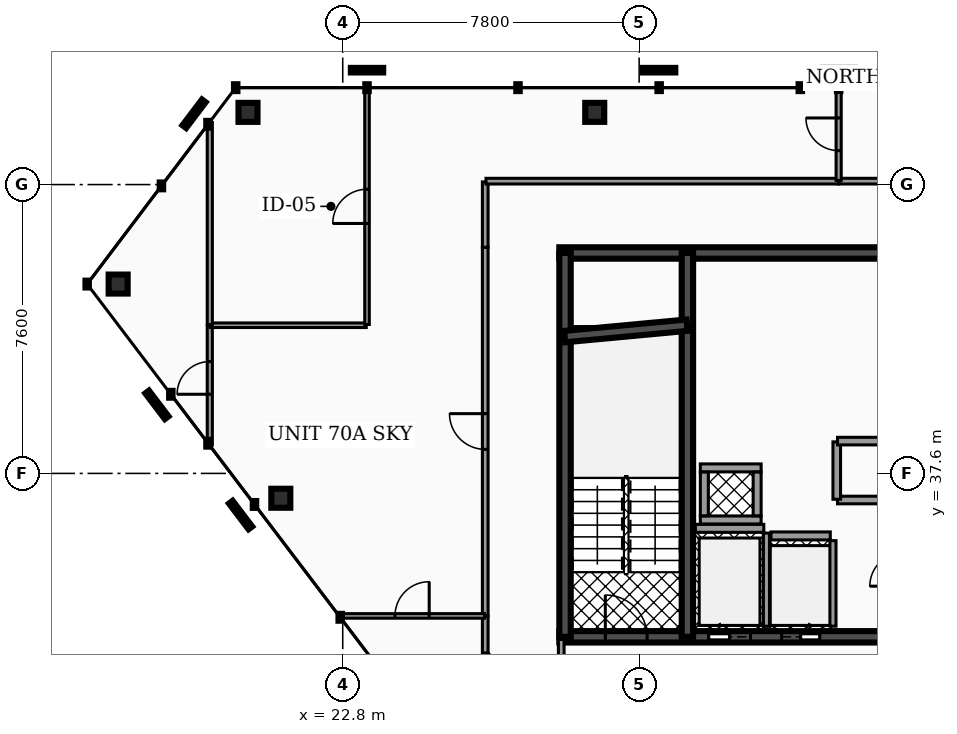
"""IFC4 building model, lengths in metres.
Left out: names, types, materials, properties, quantities, classifications, styles, units other than length and angle.
Written with IfcOpenShell. Run it as: python <this file> out.ifc"""

import sys

from ifc_helpers import new_model, si_unit, direction, frame, frame_2d, origin, origin_2d, place, context, subcontext, project, spatial, rectangle, hollow_rectangle, extrude, element, fill, save


model = new_model("IFC4")
c1 = context("Model", 3, precision=1e-05, world=origin(), true_north=direction((0.0, 1.0)))
c2 = subcontext(c1, "Body", "Model", "MODEL_VIEW")
j1 = project(units=[si_unit("LENGTHUNIT", "METRE"), si_unit("PLANEANGLEUNIT", "RADIAN")], contexts=[c1])
p1 = place(None, origin())
s1 = spatial("IfcSite", under=j1, at=p1, CompositionType="ELEMENT")
p2 = place(p1, origin())
s2 = spatial("IfcBuilding", under=s1, at=p2, CompositionType="ELEMENT")
p3 = place(p2, frame((0.0, 0.0, 275.4)))
s3 = spatial("IfcBuildingStorey", under=s2, at=p3, CompositionType="ELEMENT", Elevation=275.4)
p4 = place(p3, frame((28.5, 43.4, 0.0), z_axis=(0.0, 0.0, 1.0), x_axis=(1.0, 0.0, 0.0)))
e1 = element("IfcWall", 1, at=p4, inside=s3, PredefinedType="SHEAR", context=c2, shape_type="SweptSolid", body=[
    extrude(rectangle(XDim=19.86, YDim=0.3, at=frame_2d((9.93, 0.0))), origin(), (0.0, 0.0, 1.0), 3.18),
])
p5 = place(p3, frame((28.5, 33.3, 0.0), z_axis=(0.0, 0.0, 1.0), x_axis=(1.0, 0.0, 0.0)))
e2 = element("IfcWall", 2, at=p5, inside=s3, PredefinedType="SHEAR", context=c2, shape_type="SweptSolid", body=[
    extrude(rectangle(XDim=19.86, YDim=0.3, at=frame_2d((9.93, 0.0))), origin(), (0.0, 0.0, 1.0), 3.18),
])
p6 = place(p5, frame((3.93, 0.0, 0.0)))
e3 = element("IfcOpeningElement", 3, at=p6, cuts=e2, PredefinedType="OPENING", context=c2, shape_type="SweptSolid", body=[
    extrude(rectangle(XDim=1.1, YDim=2.15, at=frame_2d((0.55, 1.075))), frame((0.0, 0.16, 0.0), z_axis=(0.0, -1.0, 0.0), x_axis=(1.0, 0.0, 0.0)), (0.0, 0.0, 1.0), 0.32),
])
p7 = place(p5, frame((14.77, 0.0, 0.0)))
e4 = element("IfcOpeningElement", 4, at=p7, cuts=e2, PredefinedType="OPENING", context=c2, shape_type="SweptSolid", body=[
    extrude(rectangle(XDim=1.1, YDim=2.15, at=frame_2d((0.55, 1.075))), frame((0.0, 0.16, 0.0), z_axis=(0.0, -1.0, 0.0), x_axis=(1.0, 0.0, 0.0)), (0.0, 0.0, 1.0), 0.32),
])
p8 = place(p5, frame((11.25, 0.0, 0.0)))
e5 = element("IfcOpeningElement", 5, at=p8, cuts=e2, PredefinedType="OPENING", context=c2, shape_type="SweptSolid", body=[
    extrude(rectangle(XDim=1.0, YDim=2.1, at=frame_2d((0.5, 1.05))), frame((0.0, 0.16, 0.0), z_axis=(0.0, -1.0, 0.0), x_axis=(1.0, 0.0, 0.0)), (0.0, 0.0, 1.0), 0.32),
])
p9 = place(p5, frame((12.95, 0.0, 0.0)))
e6 = element("IfcOpeningElement", 6, at=p9, cuts=e2, PredefinedType="OPENING", context=c2, shape_type="SweptSolid", body=[
    extrude(rectangle(XDim=1.0, YDim=2.1, at=frame_2d((0.5, 1.05))), frame((0.0, 0.16, 0.0), z_axis=(0.0, -1.0, 0.0), x_axis=(1.0, 0.0, 0.0)), (0.0, 0.0, 1.0), 0.32),
])
p10 = place(p5, frame((5.85, 0.0, 0.0)))
e7 = element("IfcOpeningElement", 7, at=p10, cuts=e2, PredefinedType="OPENING", context=c2, shape_type="SweptSolid", body=[
    extrude(rectangle(XDim=1.0, YDim=2.1, at=frame_2d((0.5, 1.05))), frame((0.0, 0.16, 0.0), z_axis=(0.0, -1.0, 0.0), x_axis=(1.0, 0.0, 0.0)), (0.0, 0.0, 1.0), 0.32),
])
p11 = place(p5, frame((1.21, 0.0, 0.0)))
e8 = element("IfcOpeningElement", 8, at=p11, cuts=e2, PredefinedType="OPENING", context=c2, shape_type="SweptSolid", body=[
    extrude(rectangle(XDim=1.1, YDim=2.2, at=frame_2d((0.55, 1.1))), frame((0.0, 0.16, 0.0), z_axis=(0.0, -1.0, 0.0), x_axis=(1.0, 0.0, 0.0)), (0.0, 0.0, 1.0), 0.32),
])
p12 = place(p5, frame((9.34, 0.0, 0.0)))
e9 = element("IfcOpeningElement", 9, at=p12, cuts=e2, PredefinedType="OPENING", context=c2, shape_type="SweptSolid", body=[
    extrude(rectangle(XDim=1.12, YDim=2.05, at=frame_2d((0.56, 1.025))), frame((0.0, 0.16, 0.0), z_axis=(0.0, -1.0, 0.0), x_axis=(1.0, 0.0, 0.0)), (0.0, 0.0, 1.0), 0.32),
])
p13 = place(p5, frame((17.55, 0.0, 0.0)))
e10 = element("IfcOpeningElement", 10, at=p13, cuts=e2, PredefinedType="OPENING", context=c2, shape_type="SweptSolid", body=[
    extrude(rectangle(XDim=1.1, YDim=2.2, at=frame_2d((0.55, 1.1))), frame((0.0, 0.16, 0.0), z_axis=(0.0, -1.0, 0.0), x_axis=(1.0, 0.0, 0.0)), (0.0, 0.0, 1.0), 0.32),
])
for number, where, z_axis, x_axis in (
    (11, (28.65, 33.3, 0.0), (0.0, 0.0, 1.0), (0.0, 1.0, 0.0)),
    (12, (31.87, 33.3, 0.0), (0.0, 0.0, 1.0), (0.0, 1.0, 0.0)),
):
    element("IfcWall", number, at=place(p3, frame(where, z_axis=z_axis, x_axis=x_axis)), inside=s3, PredefinedType="SHEAR", context=c2, shape_type="SweptSolid", body=[
        extrude(rectangle(XDim=10.1, YDim=0.3, at=frame_2d((5.05, 0.0))), origin(), (0.0, 0.0, 1.0), 3.18),
    ])
p14 = place(p3, frame((28.64, 41.2, 0.0), z_axis=(0.0, 0.0, 1.0), x_axis=(0.995687118776, 0.092774789157, 0.0)))
e13 = element("IfcWall", 13, at=p14, inside=s3, PredefinedType="SHEAR", context=c2, shape_type="SweptSolid", body=[
    extrude(rectangle(XDim=3.234, YDim=0.3, at=frame_2d((1.617, 0.0))), origin(), (0.0, 0.0, 1.0), 3.18),
])
p15 = place(p3, frame((29.431, 47.1, 0.0), z_axis=(-0.046440886418, -0.036631590277, 0.998249152598), x_axis=(0.619308165543, -0.785148009035, 0.0)))
e14 = element("IfcColumn", 14, at=p15, inside=s3, PredefinedType="COLUMN", context=c2, shape_type="SweptSolid", body=[
    extrude(hollow_rectangle(XDim=0.5, YDim=0.5, WallThickness=0.025, at=origin_2d()), origin(), (0.0, 0.0, 1.0), 3.186),
])
p16 = place(p3, frame((20.307, 47.1, 0.0), z_axis=(-0.044069935596, -0.03663552907, 0.998356488829), x_axis=(0.639263127268, -0.768988071504, 0.0)))
e15 = element("IfcColumn", 15, at=p16, inside=s3, PredefinedType="COLUMN", context=c2, shape_type="SweptSolid", body=[
    extrude(hollow_rectangle(XDim=0.5, YDim=0.5, WallThickness=0.025, at=origin_2d()), origin(), (0.0, 0.0, 1.0), 3.185),
])
p17 = place(p3, frame((16.891, 42.582, 0.0), z_axis=(0.07128582903, 0.113281322759, 0.991002357461), x_axis=(-0.846365703842, 0.532602192411, 0.0)))
e16 = element("IfcColumn", 16, at=p17, inside=s3, PredefinedType="COLUMN", context=c2, shape_type="SweptSolid", body=[
    extrude(hollow_rectangle(XDim=0.5, YDim=0.5, WallThickness=0.025, at=origin_2d()), origin(), (0.0, 0.0, 1.0), 3.209),
])
p18 = place(p3, frame((21.171, 36.946, 0.0), z_axis=(0.070561625905, 0.118464453837, 0.99044799466), x_axis=(-0.859142811566, 0.511735898032, 0.0)))
e17 = element("IfcColumn", 17, at=p18, inside=s3, PredefinedType="COLUMN", context=c2, shape_type="SweptSolid", body=[
    extrude(hollow_rectangle(XDim=0.5, YDim=0.5, WallThickness=0.025, at=origin_2d()), origin(), (0.0, 0.0, 1.0), 3.211),
])
p19 = place(p3, frame((32.08, 36.155, 0.0), z_axis=(0.0, 0.0, 1.0), x_axis=(1.0, 0.0, 0.0)))
e18 = element("IfcWall", 18, at=p19, inside=s3, PredefinedType="SOLIDWALL", context=c2, shape_type="SweptSolid", body=[
    extrude(rectangle(XDim=1.8, YDim=0.21, at=frame_2d((0.9, 0.0))), origin(), (0.0, 0.0, 1.0), 3.18),
])
p20 = place(p3, frame((33.95, 33.58, 0.0), z_axis=(0.0, 0.0, 1.0), x_axis=(0.0, 1.0, 0.0)))
e19 = element("IfcWall", 19, at=p20, inside=s3, PredefinedType="SOLIDWALL", context=c2, shape_type="SweptSolid", body=[
    extrude(rectangle(XDim=2.45, YDim=0.16, at=frame_2d((1.225, 0.0))), origin(), (0.0, 0.0, 1.0), 3.18),
])
p21 = place(p3, frame((34.07, 35.955, 0.0), z_axis=(0.0, 0.0, 1.0), x_axis=(1.0, 0.0, 0.0)))
e20 = element("IfcWall", 20, at=p21, inside=s3, PredefinedType="SOLIDWALL", context=c2, shape_type="SweptSolid", body=[
    extrude(rectangle(XDim=1.56, YDim=0.21, at=frame_2d((0.78, 0.0))), origin(), (0.0, 0.0, 1.0), 3.18),
])
p22 = place(p3, frame((35.7, 33.58, 0.0), z_axis=(0.0, 0.0, 1.0), x_axis=(0.0, 1.0, 0.0)))
e21 = element("IfcWall", 21, at=p22, inside=s3, PredefinedType="SOLIDWALL", context=c2, shape_type="SweptSolid", body=[
    extrude(rectangle(XDim=2.25, YDim=0.16, at=frame_2d((1.125, 0.0))), origin(), (0.0, 0.0, 1.0), 3.18),
])
for number, where, z_axis, x_axis in (
    (22, (32.21, 36.375, 0.0), (0.0, 0.0, 1.0), (1.0, 0.0, 0.0)),
    (23, (32.21, 37.745, 0.0), (0.0, 0.0, 1.0), (1.0, 0.0, 0.0)),
):
    element("IfcWall", number, at=place(p3, frame(where, z_axis=z_axis, x_axis=x_axis)), inside=s3, PredefinedType="SOLIDWALL", context=c2, shape_type="SweptSolid", body=[
        extrude(rectangle(XDim=1.6, YDim=0.21, at=frame_2d((0.8, 0.0))), origin(), (0.0, 0.0, 1.0), 3.18),
    ])
for number, where, z_axis, x_axis in (
    (24, (32.315, 36.485, 0.0), (0.0, 0.0, 1.0), (0.0, 1.0, 0.0)),
    (25, (33.705, 36.485, 0.0), (0.0, 0.0, 1.0), (0.0, 1.0, 0.0)),
):
    element("IfcWall", number, at=place(p3, frame(where, z_axis=z_axis, x_axis=x_axis)), inside=s3, PredefinedType="SOLIDWALL", context=c2, shape_type="SweptSolid", body=[
        extrude(rectangle(XDim=1.15, YDim=0.21, at=frame_2d((0.575, 0.0))), origin(), (0.0, 0.0, 1.0), 3.18),
    ])
p23 = place(p3, frame((35.82, 36.9, 0.0), z_axis=(0.0, 0.0, 1.0), x_axis=(1.0, 0.0, 0.0)))
e26 = element("IfcWall", 26, at=p23, inside=s3, PredefinedType="PARTITIONING", context=c2, shape_type="SweptSolid", body=[
    extrude(rectangle(XDim=1.71, YDim=0.2, at=frame_2d((0.855, 0.0))), origin(), (0.0, 0.0, 1.0), 2.235),
])
p24 = place(p3, frame((35.8, 36.92, 0.0), z_axis=(0.0, 0.0, 1.0), x_axis=(0.0, 1.0, 0.0)))
e27 = element("IfcWall", 27, at=p24, inside=s3, PredefinedType="PARTITIONING", context=c2, shape_type="SweptSolid", body=[
    extrude(rectangle(XDim=1.51, YDim=0.2, at=frame_2d((0.755, 0.0))), origin(), (0.0, 0.0, 1.0), 2.235),
])
p25 = place(p3, frame((35.82, 38.45, 0.0), z_axis=(0.0, 0.0, 1.0), x_axis=(1.0, 0.0, 0.0)))
e28 = element("IfcWall", 28, at=p25, inside=s3, PredefinedType="PARTITIONING", context=c2, shape_type="SweptSolid", body=[
    extrude(rectangle(XDim=1.71, YDim=0.2, at=frame_2d((0.855, 0.0))), origin(), (0.0, 0.0, 1.0), 2.235),
])
p26 = place(p3, frame((28.55, 30.227, 0.0), z_axis=(0.0, 0.0, 1.0), x_axis=(0.0, 1.0, 0.0)))
e29 = element("IfcWall", 29, at=p26, inside=s3, PredefinedType="PARTITIONING", context=c2, shape_type="SweptSolid", body=[
    extrude(rectangle(XDim=3.003, YDim=0.15, at=frame_2d((1.501, 0.0))), origin(), (0.0, 0.0, 1.0), 2.235),
])
p27 = place(p26, frame((1.431, 0.0, 0.0)))
e30 = element("IfcOpeningElement", 30, at=p27, cuts=e29, PredefinedType="OPENING", context=c2, shape_type="SweptSolid", body=[
    extrude(rectangle(XDim=0.94, YDim=2.05, at=frame_2d((0.47, 1.025))), frame((0.0, 0.085, 0.0), z_axis=(0.0, -1.0, 0.0), x_axis=(1.0, 0.0, 0.0)), (0.0, 0.0, 1.0), 0.17),
])
p28 = place(p3, frame((26.55, 33.855, 0.0), z_axis=(0.0, 0.0, 1.0), x_axis=(0.0, 1.0, 0.0)))
e31 = element("IfcWall", 31, at=p28, inside=s3, PredefinedType="PARTITIONING", context=c2, shape_type="SweptSolid", body=[
    extrude(rectangle(XDim=9.695, YDim=0.15, at=frame_2d((4.847, 0.0))), origin(), (0.0, 0.0, 1.0), 2.235),
])
p29 = place(p28, frame((4.377, 0.0, 0.0)))
e32 = element("IfcOpeningElement", 32, at=p29, cuts=e31, PredefinedType="OPENING", context=c2, shape_type="SweptSolid", body=[
    extrude(rectangle(XDim=0.94, YDim=2.05, at=frame_2d((0.47, 1.025))), frame((0.0, 0.085, 0.0), z_axis=(0.0, -1.0, 0.0), x_axis=(1.0, 0.0, 0.0)), (0.0, 0.0, 1.0), 0.17),
])
p30 = place(p3, frame((26.55, 43.55, 0.0), z_axis=(0.0, 0.0, 1.0), x_axis=(0.0, 1.0, 0.0)))
e33 = element("IfcWall", 33, at=p30, inside=s3, PredefinedType="PARTITIONING", context=c2, shape_type="SweptSolid", body=[
    extrude(rectangle(XDim=1.72, YDim=0.15, at=frame_2d((0.86, 0.0))), origin(), (0.0, 0.0, 1.0), 2.235),
])
p31 = place(p3, frame((26.57, 45.29, 0.0), z_axis=(0.0, 0.0, 1.0), x_axis=(1.0, 0.0, 0.0)))
e34 = element("IfcWall", 34, at=p31, inside=s3, PredefinedType="PARTITIONING", context=c2, shape_type="SweptSolid", body=[
    extrude(rectangle(XDim=9.275, YDim=0.15, at=frame_2d((4.637, 0.0))), origin(), (0.0, 0.0, 1.0), 2.235),
])
p32 = place(p3, frame((35.855, 45.29, 0.0), z_axis=(0.0, 0.0, 1.0), x_axis=(1.0, 0.0, 0.0)))
e35 = element("IfcWall", 35, at=p32, inside=s3, PredefinedType="PARTITIONING", context=c2, shape_type="SweptSolid", body=[
    extrude(rectangle(XDim=2.54, YDim=0.15, at=frame_2d((1.27, 0.0))), origin(), (0.0, 0.0, 1.0), 2.235),
])
p33 = place(p3, frame((26.562, 32.84, 0.0), z_axis=(0.0, 0.0, 1.0), x_axis=(0.604783852999, -0.796389660375, 0.0)))
e36 = element("IfcWall", 36, at=p33, inside=s3, PredefinedType="PARTITIONING", context=c2, shape_type="SweptSolid", body=[
    extrude(rectangle(XDim=3.267, YDim=0.15, at=frame_2d((1.634, 0.0))), origin(), (0.0, 0.0, 1.0), 2.235),
])
p34 = place(p3, frame((26.55, 32.875, 0.0), z_axis=(0.0, 0.0, 1.0), x_axis=(0.0, 1.0, 0.0)))
e37 = element("IfcWall", 37, at=p34, inside=s3, PredefinedType="PARTITIONING", context=c2, shape_type="SweptSolid", body=[
    extrude(rectangle(XDim=0.97, YDim=0.15, at=frame_2d((0.485, 0.0))), origin(), (0.0, 0.0, 1.0), 2.235),
])
p35 = place(p3, frame((19.302, 38.347, 0.0), z_axis=(0.0, 0.0, 1.0), x_axis=(0.0, 1.0, 0.0)))
e38 = element("IfcWall", 38, at=p35, inside=s3, PredefinedType="PARTITIONING", context=c2, shape_type="SweptSolid", body=[
    extrude(rectangle(XDim=3.132, YDim=0.135, at=frame_2d((1.566, 0.0))), origin(), (0.0, 0.0, 1.0), 2.235),
])
p36 = place(p35, frame((1.336, 0.0, 0.0)))
e39 = element("IfcOpeningElement", 39, at=p36, cuts=e38, PredefinedType="OPENING", context=c2, shape_type="SweptSolid", body=[
    extrude(rectangle(XDim=0.86, YDim=2.05, at=frame_2d((0.43, 1.025))), frame((0.0, 0.077, 0.0), z_axis=(0.0, -1.0, 0.0), x_axis=(1.0, 0.0, 0.0)), (0.0, 0.0, 1.0), 0.155),
])
p37 = place(p3, frame((35.85, 45.31, 0.0), z_axis=(0.0, 0.0, 1.0), x_axis=(0.0, 1.0, 0.0)))
e40 = element("IfcWall", 40, at=p37, inside=s3, PredefinedType="PARTITIONING", context=c2, shape_type="SweptSolid", body=[
    extrude(rectangle(XDim=2.425, YDim=0.135, at=frame_2d((1.212, 0.0))), origin(), (0.0, 0.0, 1.0), 2.235),
])
p38 = place(p37, frame((0.782, 0.0, 0.0)))
e41 = element("IfcOpeningElement", 41, at=p38, cuts=e40, PredefinedType="OPENING", context=c2, shape_type="SweptSolid", body=[
    extrude(rectangle(XDim=0.86, YDim=2.05, at=frame_2d((0.43, 1.025))), frame((0.0, 0.077, 0.0), z_axis=(0.0, -1.0, 0.0), x_axis=(1.0, 0.0, 0.0)), (0.0, 0.0, 1.0), 0.155),
])
p39 = place(p3, frame((19.322, 41.499, 0.0), z_axis=(0.0, 0.0, 1.0), x_axis=(1.0, 0.0, 0.0)))
e42 = element("IfcWall", 42, at=p39, inside=s3, PredefinedType="PARTITIONING", context=c2, shape_type="SweptSolid", body=[
    extrude(rectangle(XDim=4.097, YDim=0.12, at=frame_2d((2.048, 0.0))), origin(), (0.0, 0.0, 1.0), 2.235),
])
p40 = place(p3, frame((23.439, 41.519, 0.0), z_axis=(0.0, 0.0, 1.0), x_axis=(0.0, 1.0, 0.0)))
e43 = element("IfcWall", 43, at=p40, inside=s3, PredefinedType="PARTITIONING", context=c2, shape_type="SweptSolid", body=[
    extrude(rectangle(XDim=6.217, YDim=0.12, at=frame_2d((3.108, 0.0))), origin(), (0.0, 0.0, 1.0), 2.235),
])
p41 = place(p40, frame((2.658, 0.0, 0.0)))
e44 = element("IfcOpeningElement", 44, at=p41, cuts=e43, PredefinedType="OPENING", context=c2, shape_type="SweptSolid", body=[
    extrude(rectangle(XDim=0.9, YDim=2.05, at=frame_2d((0.45, 1.025))), frame((0.0, 0.07, 0.0), z_axis=(0.0, -1.0, 0.0), x_axis=(1.0, 0.0, 0.0)), (0.0, 0.0, 1.0), 0.14),
])
p42 = place(p3, frame((22.721, 33.85, 0.0), z_axis=(0.0, 0.0, 1.0), x_axis=(1.0, 0.0, 0.0)))
e45 = element("IfcWall", 45, at=p42, inside=s3, PredefinedType="PARTITIONING", context=c2, shape_type="SweptSolid", body=[
    extrude(rectangle(XDim=3.809, YDim=0.12, at=frame_2d((1.905, 0.0))), origin(), (0.0, 0.0, 1.0), 2.235),
])
p43 = place(p42, frame((1.455, 0.0, 0.0)))
e46 = element("IfcOpeningElement", 46, at=p43, cuts=e45, PredefinedType="OPENING", context=c2, shape_type="SweptSolid", body=[
    extrude(rectangle(XDim=0.9, YDim=2.05, at=frame_2d((0.45, 1.025))), frame((0.0, 0.07, 0.0), z_axis=(0.0, -1.0, 0.0), x_axis=(1.0, 0.0, 0.0)), (0.0, 0.0, 1.0), 0.14),
])
p44 = place(p3, frame((19.302, 41.519, 0.0), z_axis=(0.0, 0.0, 1.0), x_axis=(0.0, 1.0, 0.0)))
e47 = element("IfcWall", 47, at=p44, inside=s3, PredefinedType="PARTITIONING", context=c2, shape_type="SweptSolid", body=[
    extrude(rectangle(XDim=5.315, YDim=0.135, at=frame_2d((2.658, 0.0))), origin(), (0.0, 0.0, 1.0), 2.235),
])
p45 = place(p6, origin())
e48 = element("IfcDoor", 48, at=p45, inside=s3, OperationType="SLIDING_TO_LEFT", PredefinedType="DOOR", context=c2, shape_type="SweptSolid", body=[
    extrude(rectangle(XDim=1.1, YDim=2.15, at=frame_2d((0.55, 1.075))), frame((0.0, 0.025, 0.0), z_axis=(0.0, -1.0, 0.0), x_axis=(1.0, 0.0, 0.0)), (0.0, 0.0, 1.0), 0.05),
])
fill(e3, e48)
p46 = place(p10, origin())
e49 = element("IfcDoor", 49, at=p46, inside=s3, OperationType="SLIDING_TO_RIGHT", PredefinedType="DOOR", context=c2, shape_type="SweptSolid", body=[
    extrude(rectangle(XDim=1.0, YDim=2.1, at=frame_2d((0.5, 1.05))), frame((0.0, 0.025, 0.0), z_axis=(0.0, -1.0, 0.0), x_axis=(1.0, 0.0, 0.0)), (0.0, 0.0, 1.0), 0.05),
])
fill(e7, e49)
p47 = place(p11, origin())
e50 = element("IfcDoor", 50, at=p47, inside=s3, OperationType="SINGLE_SWING_LEFT", PredefinedType="DOOR", context=c2, shape_type="SweptSolid", body=[
    extrude(rectangle(XDim=1.1, YDim=2.2, at=frame_2d((0.55, 1.1))), frame((0.0, 0.025, 0.0), z_axis=(0.0, -1.0, 0.0), x_axis=(1.0, 0.0, 0.0)), (0.0, 0.0, 1.0), 0.05),
])
fill(e8, e50)
p48 = place(p29, origin())
e51 = element("IfcDoor", 51, at=p48, inside=s3, OperationType="SINGLE_SWING_RIGHT", PredefinedType="DOOR", context=c2, shape_type="SweptSolid", body=[
    extrude(rectangle(XDim=0.94, YDim=2.05, at=frame_2d((0.47, 1.025))), frame((0.0, 0.025, 0.0), z_axis=(0.0, -1.0, 0.0), x_axis=(1.0, 0.0, 0.0)), (0.0, 0.0, 1.0), 0.05),
])
fill(e32, e51)
p49 = place(p36, origin())
e52 = element("IfcDoor", 52, at=p49, inside=s3, OperationType="SINGLE_SWING_LEFT", PredefinedType="DOOR", context=c2, shape_type="SweptSolid", body=[
    extrude(rectangle(XDim=0.86, YDim=2.05, at=frame_2d((0.43, 1.025))), frame((0.0, 0.025, 0.0), z_axis=(0.0, -1.0, 0.0), x_axis=(1.0, 0.0, 0.0)), (0.0, 0.0, 1.0), 0.05),
])
fill(e39, e52)
p50 = place(p38, origin())
e53 = element("IfcDoor", 53, at=p50, inside=s3, OperationType="SINGLE_SWING_RIGHT", PredefinedType="DOOR", context=c2, shape_type="SweptSolid", body=[
    extrude(rectangle(XDim=0.86, YDim=2.05, at=frame_2d((0.43, 1.025))), frame((0.0, 0.025, 0.0), z_axis=(0.0, -1.0, 0.0), x_axis=(1.0, 0.0, 0.0)), (0.0, 0.0, 1.0), 0.05),
])
fill(e41, e53)
p51 = place(p41, origin())
e54 = element("IfcDoor", 54, at=p51, inside=s3, OperationType="SINGLE_SWING_LEFT", PredefinedType="DOOR", context=c2, shape_type="SweptSolid", body=[
    extrude(rectangle(XDim=0.9, YDim=2.05, at=frame_2d((0.45, 1.025))), frame((0.0, 0.025, 0.0), z_axis=(0.0, -1.0, 0.0), x_axis=(1.0, 0.0, 0.0)), (0.0, 0.0, 1.0), 0.05),
])
fill(e44, e54)
p52 = place(p43, origin())
e55 = element("IfcDoor", 55, at=p52, inside=s3, OperationType="SINGLE_SWING_RIGHT", PredefinedType="DOOR", context=c2, shape_type="SweptSolid", body=[
    extrude(rectangle(XDim=0.9, YDim=2.05, at=frame_2d((0.45, 1.025))), frame((0.0, 0.025, 0.0), z_axis=(0.0, -1.0, 0.0), x_axis=(1.0, 0.0, 0.0)), (0.0, 0.0, 1.0), 0.05),
])
fill(e46, e55)
save(model, sys.argv[1])
